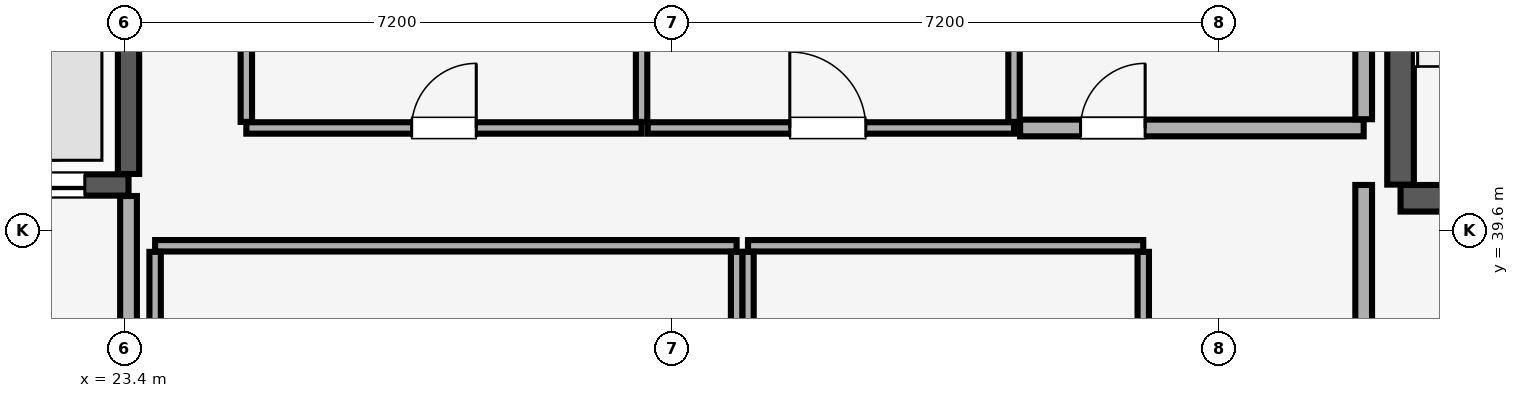
"""IFC4 building model, lengths in metres.
Left out: names, types, materials, properties, quantities, classifications, styles, units other than length and angle.
Written with IfcOpenShell. Run it as: python <this file> out.ifc"""

import sys

from ifc_helpers import new_model, si_unit, direction, frame, frame_2d, origin, place, context, subcontext, project, spatial, rectangle, extrude, element, fill, save


model = new_model("IFC4")
c1 = context("Model", 3, precision=1e-05, world=origin(), true_north=direction((0.0, 1.0)))
c2 = subcontext(c1, "Body", "Model", "MODEL_VIEW")
j1 = project(units=[si_unit("LENGTHUNIT", "METRE"), si_unit("PLANEANGLEUNIT", "RADIAN")], contexts=[c1])
p1 = place(None, origin())
s1 = spatial("IfcSite", under=j1, at=p1, CompositionType="ELEMENT")
p2 = place(p1, origin())
s2 = spatial("IfcBuilding", under=s1, at=p2, CompositionType="ELEMENT")
p3 = place(p2, frame((0.0, 0.0, 300.2)))
s3 = spatial("IfcBuildingStorey", under=s2, at=p3, CompositionType="ELEMENT", Elevation=300.2)
p4 = place(p3, frame((40.185, 40.025, 0.0), z_axis=(0.0, 0.0, 1.0), x_axis=(1.0, 0.0, 0.0)))
e1 = element("IfcWall", 1, at=p4, inside=s3, PredefinedType="SHEAR", context=c2, shape_type="SweptSolid", body=[
    extrude(rectangle(XDim=3.63, YDim=0.35, at=frame_2d((1.815, 0.0))), origin(), (0.0, 0.0, 1.0), 5.12),
])
p5 = place(p4, frame((1.24, 0.0, 0.0)))
e2 = element("IfcOpeningElement", 2, at=p5, cuts=e1, PredefinedType="OPENING", context=c2, shape_type="SweptSolid", body=[
    extrude(rectangle(XDim=1.15, YDim=2.15, at=frame_2d((0.575, 1.075))), frame((0.0, 0.185, 0.0), z_axis=(0.0, -1.0, 0.0), x_axis=(1.0, 0.0, 0.0)), (0.0, 0.0, 1.0), 0.37),
])
p6 = place(p3, frame((40.185, 40.205, 0.0), z_axis=(0.0, 0.0, 1.0), x_axis=(0.0, 1.0, 0.0)))
e3 = element("IfcWall", 3, at=p6, inside=s3, PredefinedType="SHEAR", context=c2, shape_type="SweptSolid", body=[
    extrude(rectangle(XDim=8.09, YDim=0.35, at=frame_2d((4.045, 0.0))), origin(), (0.0, 0.0, 1.0), 5.12),
])
p7 = place(p3, frame((21.035, 40.2, 0.0), z_axis=(0.0, 0.0, 1.0), x_axis=(1.0, 0.0, 0.0)))
e4 = element("IfcWall", 4, at=p7, inside=s3, PredefinedType="SHEAR", context=c2, shape_type="SweptSolid", body=[
    extrude(rectangle(XDim=2.415, YDim=0.28, at=frame_2d((1.208, 0.0))), origin(), (0.0, 0.0, 1.0), 5.12),
])
p8 = place(p7, frame((0.54, 0.0, 0.0)))
e5 = element("IfcOpeningElement", 5, at=p8, cuts=e4, PredefinedType="OPENING", context=c2, shape_type="SweptSolid", body=[
    extrude(rectangle(XDim=1.3, YDim=2.3, at=frame_2d((0.65, 1.15))), frame((0.0, 0.15, 0.0), z_axis=(0.0, -1.0, 0.0), x_axis=(1.0, 0.0, 0.0)), (0.0, 0.0, 1.0), 0.3),
])
p9 = place(p3, frame((23.45, 40.345, 0.0), z_axis=(0.0, 0.0, 1.0), x_axis=(0.0, 1.0, 0.0)))
e6 = element("IfcWall", 6, at=p9, inside=s3, PredefinedType="SHEAR", context=c2, shape_type="SweptSolid", body=[
    extrude(rectangle(XDim=2.81, YDim=0.28, at=frame_2d((1.405, 0.0))), origin(), (0.0, 0.0, 1.0), 5.12),
])
p10 = place(p3, frame((23.45, 34.415, 0.0), z_axis=(0.0, 0.0, 1.0), x_axis=(0.0, 1.0, 0.0)))
e7 = element("IfcWall", 7, at=p10, inside=s3, PredefinedType="PARTITIONING", context=c2, shape_type="SweptSolid", body=[
    extrude(rectangle(XDim=5.64, YDim=0.22, at=frame_2d((2.82, 0.0))), origin(), (0.0, 0.0, 1.0), 5.12),
])
p11 = place(p3, frame((39.7, 34.415, 0.0), z_axis=(0.0, 0.0, 1.0), x_axis=(0.0, 1.0, 0.0)))
e8 = element("IfcWall", 8, at=p11, inside=s3, PredefinedType="PARTITIONING", context=c2, shape_type="SweptSolid", body=[
    extrude(rectangle(XDim=5.785, YDim=0.22, at=frame_2d((2.893, 0.0))), origin(), (0.0, 0.0, 1.0), 5.12),
])
p12 = place(p3, frame((31.6, 39.4, 0.0), z_axis=(0.0, 0.0, 1.0), x_axis=(1.0, 0.0, 0.0)))
e9 = element("IfcWall", 9, at=p12, inside=s3, PredefinedType="PARTITIONING", context=c2, shape_type="SweptSolid", body=[
    extrude(rectangle(XDim=5.2, YDim=0.15, at=frame_2d((2.6, 0.0))), origin(), (0.0, 0.0, 1.0), 5.12),
])
for number, where, z_axis, x_axis in (
    (10, (31.6, 34.38, 0.0), (0.0, 0.0, 1.0), (0.0, 1.0, 0.0)),
    (11, (36.8, 34.38, 0.0), (0.0, 0.0, 1.0), (0.0, 1.0, 0.0)),
):
    element("IfcWall", number, at=place(p3, frame(where, z_axis=z_axis, x_axis=x_axis)), inside=s3, PredefinedType="PARTITIONING", context=c2, shape_type="SweptSolid", body=[
        extrude(rectangle(XDim=4.94, YDim=0.15, at=frame_2d((2.47, 0.0))), origin(), (0.0, 0.0, 1.0), 5.12),
    ])
p13 = place(p3, frame((23.8, 39.4, 0.0), z_axis=(0.0, 0.0, 1.0), x_axis=(1.0, 0.0, 0.0)))
e12 = element("IfcWall", 12, at=p13, inside=s3, PredefinedType="PARTITIONING", context=c2, shape_type="SweptSolid", body=[
    extrude(rectangle(XDim=7.65, YDim=0.15, at=frame_2d((3.825, 0.0))), origin(), (0.0, 0.0, 1.0), 5.12),
])
for number, where, z_axis, x_axis in (
    (13, (23.8, 34.38, 0.0), (0.0, 0.0, 1.0), (0.0, 1.0, 0.0)),
    (14, (31.45, 34.38, 0.0), (0.0, 0.0, 1.0), (0.0, 1.0, 0.0)),
):
    element("IfcWall", number, at=place(p3, frame(where, z_axis=z_axis, x_axis=x_axis)), inside=s3, PredefinedType="PARTITIONING", context=c2, shape_type="SweptSolid", body=[
        extrude(rectangle(XDim=4.94, YDim=0.15, at=frame_2d((2.47, 0.0))), origin(), (0.0, 0.0, 1.0), 5.12),
    ])
p14 = place(p3, frame((25.0, 40.95, 0.0), z_axis=(0.0, 0.0, 1.0), x_axis=(1.0, 0.0, 0.0)))
e15 = element("IfcWall", 15, at=p14, inside=s3, PredefinedType="PARTITIONING", context=c2, shape_type="SweptSolid", body=[
    extrude(rectangle(XDim=5.2, YDim=0.15, at=frame_2d((2.6, 0.0))), origin(), (0.0, 0.0, 1.0), 5.12),
])
p15 = place(p14, frame((2.175, 0.0, 0.0)))
e16 = element("IfcOpeningElement", 16, at=p15, cuts=e15, PredefinedType="OPENING", context=c2, shape_type="SweptSolid", body=[
    extrude(rectangle(XDim=0.85, YDim=2.1, at=frame_2d((0.425, 1.05))), frame((0.0, 0.085, 0.0), z_axis=(0.0, -1.0, 0.0), x_axis=(1.0, 0.0, 0.0)), (0.0, 0.0, 1.0), 0.17),
])
for number, where, z_axis, x_axis in (
    (17, (25.0, 41.03, 0.0), (0.0, 0.0, 1.0), (0.0, 1.0, 0.0)),
    (18, (30.2, 41.03, 0.0), (0.0, 0.0, 1.0), (0.0, 1.0, 0.0)),
):
    element("IfcWall", number, at=place(p3, frame(where, z_axis=z_axis, x_axis=x_axis)), inside=s3, PredefinedType="PARTITIONING", context=c2, shape_type="SweptSolid", body=[
        extrude(rectangle(XDim=7.82, YDim=0.15, at=frame_2d((3.91, 0.0))), origin(), (0.0, 0.0, 1.0), 5.12),
    ])
p16 = place(p3, frame((30.28, 40.95, 0.0), z_axis=(0.0, 0.0, 1.0), x_axis=(1.0, 0.0, 0.0)))
e19 = element("IfcWall", 19, at=p16, inside=s3, PredefinedType="PARTITIONING", context=c2, shape_type="SweptSolid", body=[
    extrude(rectangle(XDim=4.82, YDim=0.15, at=frame_2d((2.41, 0.0))), origin(), (0.0, 0.0, 1.0), 5.12),
])
p17 = place(p16, frame((1.87, 0.0, 0.0)))
e20 = element("IfcOpeningElement", 20, at=p17, cuts=e19, PredefinedType="OPENING", context=c2, shape_type="SweptSolid", body=[
    extrude(rectangle(XDim=1.0, YDim=2.15, at=frame_2d((0.5, 1.075))), frame((0.0, 0.085, 0.0), z_axis=(0.0, -1.0, 0.0), x_axis=(1.0, 0.0, 0.0)), (0.0, 0.0, 1.0), 0.17),
])
p18 = place(p3, frame((35.1, 41.03, 0.0), z_axis=(0.0, 0.0, 1.0), x_axis=(0.0, 1.0, 0.0)))
e21 = element("IfcWall", 21, at=p18, inside=s3, PredefinedType="PARTITIONING", context=c2, shape_type="SweptSolid", body=[
    extrude(rectangle(XDim=7.82, YDim=0.15, at=frame_2d((3.91, 0.0))), origin(), (0.0, 0.0, 1.0), 5.12),
])
p19 = place(p3, frame((35.18, 40.95, 0.0), z_axis=(0.0, 0.0, 1.0), x_axis=(1.0, 0.0, 0.0)))
e22 = element("IfcWall", 22, at=p19, inside=s3, PredefinedType="PARTITIONING", context=c2, shape_type="SweptSolid", body=[
    extrude(rectangle(XDim=4.52, YDim=0.22, at=frame_2d((2.26, 0.0))), origin(), (0.0, 0.0, 1.0), 5.12),
])
p20 = place(p19, frame((0.795, 0.0, 0.0)))
e23 = element("IfcOpeningElement", 23, at=p20, cuts=e22, PredefinedType="OPENING", context=c2, shape_type="SweptSolid", body=[
    extrude(rectangle(XDim=0.85, YDim=2.1, at=frame_2d((0.425, 1.05))), frame((0.0, 0.12, 0.0), z_axis=(0.0, -1.0, 0.0), x_axis=(1.0, 0.0, 0.0)), (0.0, 0.0, 1.0), 0.24),
])
p21 = place(p3, frame((39.7, 41.065, 0.0), z_axis=(0.0, 0.0, 1.0), x_axis=(0.0, 1.0, 0.0)))
e24 = element("IfcWall", 24, at=p21, inside=s3, PredefinedType="PARTITIONING", context=c2, shape_type="SweptSolid", body=[
    extrude(rectangle(XDim=7.785, YDim=0.22, at=frame_2d((3.893, 0.0))), origin(), (0.0, 0.0, 1.0), 5.12),
])
p22 = place(p8, origin())
e25 = element("IfcDoor", 25, at=p22, inside=s3, OperationType="DOUBLE_DOOR_SLIDING", PredefinedType="DOOR", context=c2, shape_type="SweptSolid", body=[
    extrude(rectangle(XDim=1.3, YDim=2.3, at=frame_2d((0.65, 1.15))), frame((0.0, 0.025, 0.0), z_axis=(0.0, -1.0, 0.0), x_axis=(1.0, 0.0, 0.0)), (0.0, 0.0, 1.0), 0.05),
])
fill(e5, e25)
p23 = place(p15, origin())
e26 = element("IfcDoor", 26, at=p23, inside=s3, OperationType="SINGLE_SWING_RIGHT", PredefinedType="DOOR", context=c2, shape_type="SweptSolid", body=[
    extrude(rectangle(XDim=0.85, YDim=2.1, at=frame_2d((0.425, 1.05))), frame((0.0, 0.025, 0.0), z_axis=(0.0, -1.0, 0.0), x_axis=(1.0, 0.0, 0.0)), (0.0, 0.0, 1.0), 0.05),
])
fill(e16, e26)
p24 = place(p17, origin())
e27 = element("IfcDoor", 27, at=p24, inside=s3, OperationType="SINGLE_SWING_LEFT", PredefinedType="DOOR", context=c2, shape_type="SweptSolid", body=[
    extrude(rectangle(XDim=1.0, YDim=2.15, at=frame_2d((0.5, 1.075))), frame((0.0, 0.025, 0.0), z_axis=(0.0, -1.0, 0.0), x_axis=(1.0, 0.0, 0.0)), (0.0, 0.0, 1.0), 0.05),
])
fill(e20, e27)
p25 = place(p20, origin())
e28 = element("IfcDoor", 28, at=p25, inside=s3, OperationType="SINGLE_SWING_RIGHT", PredefinedType="DOOR", context=c2, shape_type="SweptSolid", body=[
    extrude(rectangle(XDim=0.85, YDim=2.1, at=frame_2d((0.425, 1.05))), frame((0.0, 0.025, 0.0), z_axis=(0.0, -1.0, 0.0), x_axis=(1.0, 0.0, 0.0)), (0.0, 0.0, 1.0), 0.05),
])
fill(e23, e28)
save(model, sys.argv[1])
